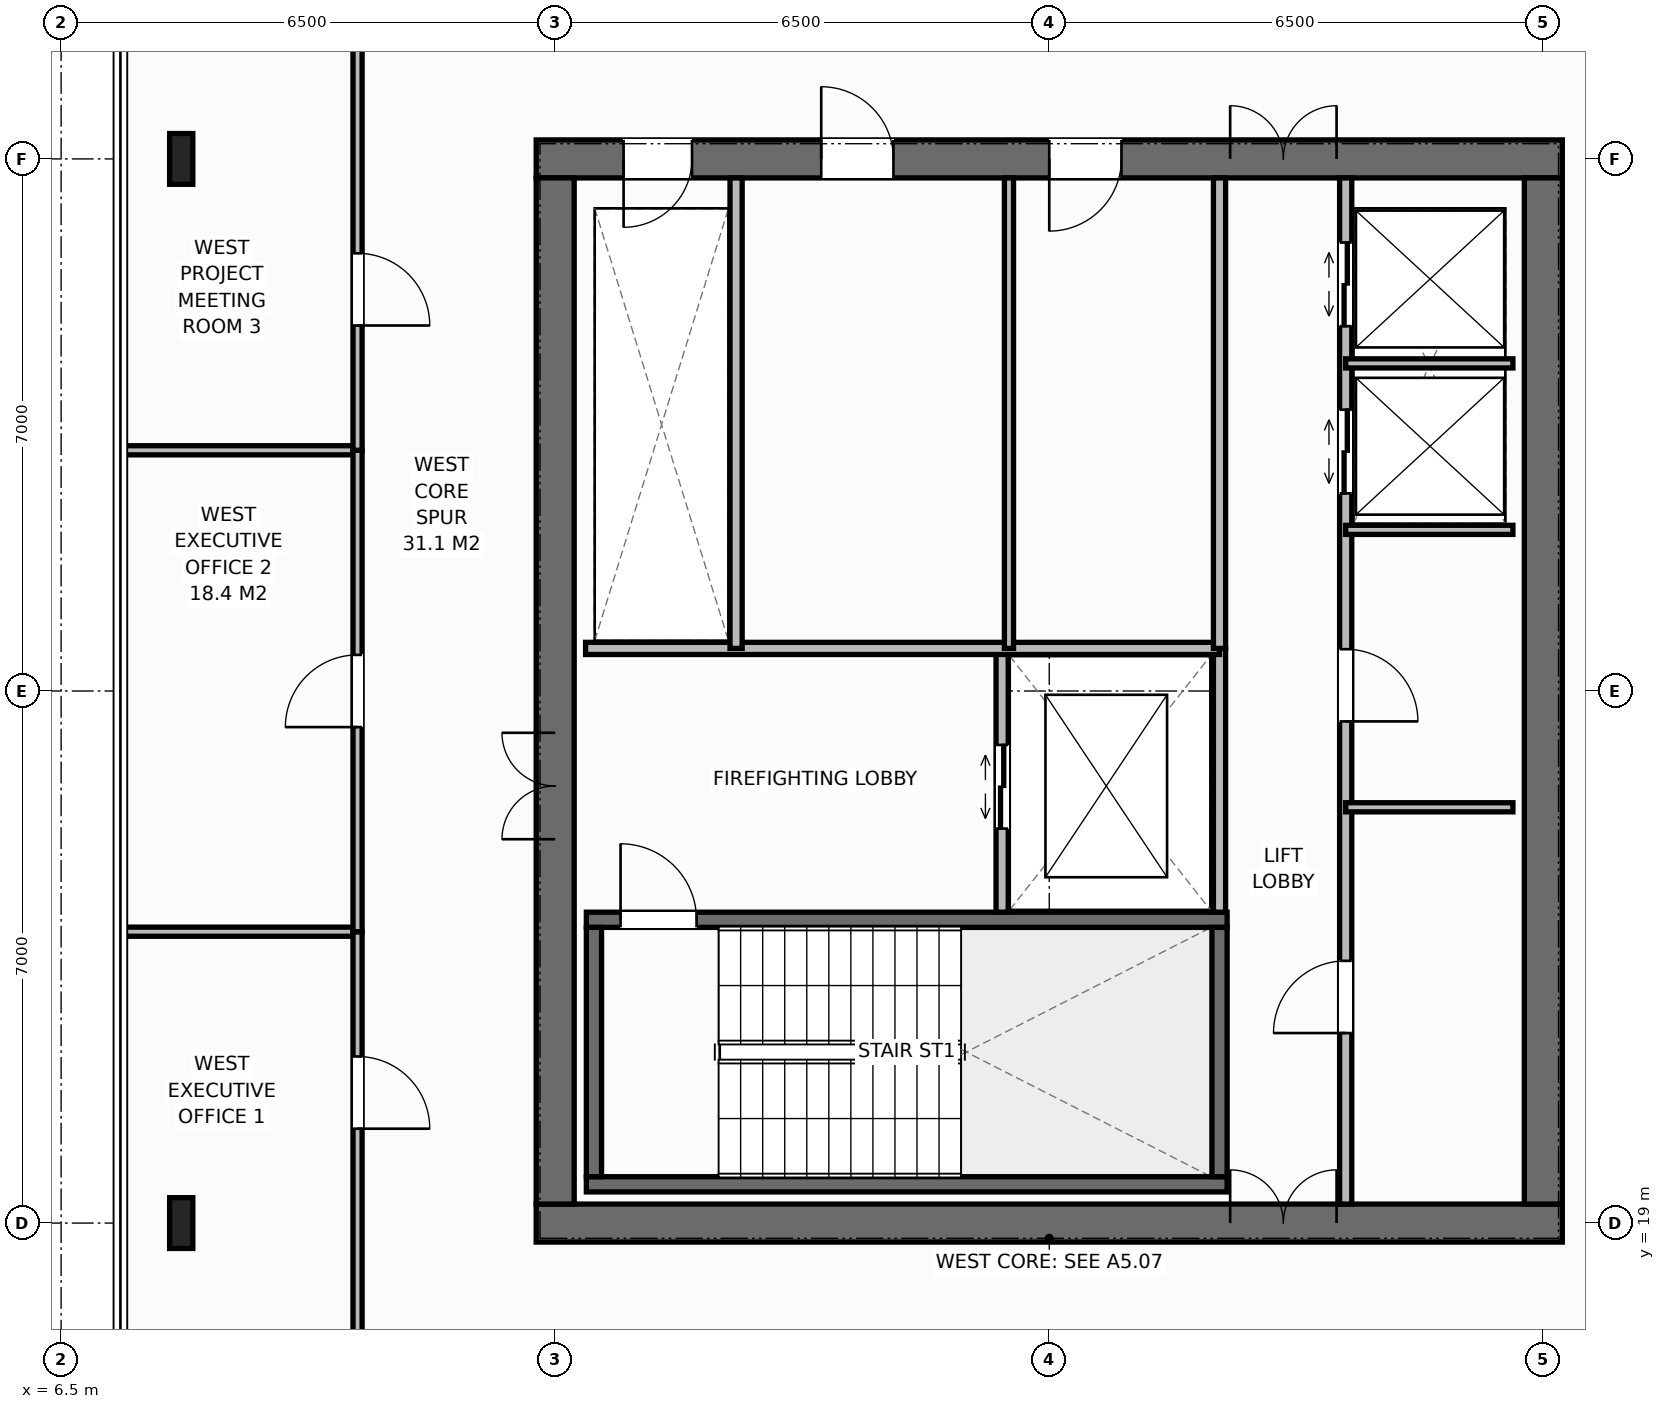
"""IFC4 building model, lengths in metres.
Left out: names, types, materials, properties, quantities, classifications, styles, units other than length and angle.
Written with IfcOpenShell. Run it as: python <this file> out.ifc"""

import sys

from ifc_helpers import new_model, si_unit, direction, frame, frame_2d, origin, origin_2d, place, context, subcontext, project, spatial, rectangle, i_section, extrude, element, fill, save


model = new_model("IFC4")
c1 = context("Model", 3, precision=1e-05, world=origin(), true_north=direction((0.0, 1.0)))
c2 = subcontext(c1, "Body", "Model", "MODEL_VIEW")
j1 = project(units=[si_unit("LENGTHUNIT", "METRE"), si_unit("PLANEANGLEUNIT", "RADIAN")], contexts=[c1])
p1 = place(None, origin())
s1 = spatial("IfcSite", under=j1, at=p1, CompositionType="ELEMENT")
p2 = place(p1, origin())
s2 = spatial("IfcBuilding", under=s1, at=p2, CompositionType="ELEMENT")
p3 = place(p2, frame((0.0, 0.0, 298.4)))
s3 = spatial("IfcBuildingStorey", under=s2, at=p3, CompositionType="ELEMENT", Elevation=298.4)
p4 = place(p3, frame((12.75, 19.0, 0.0), z_axis=(0.0, 0.0, 1.0), x_axis=(1.0, 0.0, 0.0)))
e1 = element("IfcWall", 1, at=p4, inside=s3, PredefinedType="SHEAR", context=c2, shape_type="SweptSolid", body=[
    extrude(rectangle(XDim=13.5, YDim=0.5, at=frame_2d((6.75, 0.0))), origin(), (0.0, 0.0, 1.0), 4.0),
])
p5 = place(p4, frame((9.13, 0.0, 0.0)))
e2 = element("IfcOpeningElement", 2, at=p5, cuts=e1, PredefinedType="OPENING", context=c2, shape_type="SweptSolid", body=[
    extrude(rectangle(XDim=1.4, YDim=2.2, at=frame_2d((0.7, 1.1))), frame((0.0, 0.26, 0.0), z_axis=(0.0, -1.0, 0.0), x_axis=(1.0, 0.0, 0.0)), (0.0, 0.0, 1.0), 0.52),
])
p6 = place(p3, frame((12.75, 33.0, 0.0), z_axis=(0.0, 0.0, 1.0), x_axis=(1.0, 0.0, 0.0)))
e3 = element("IfcWall", 3, at=p6, inside=s3, PredefinedType="SHEAR", context=c2, shape_type="SweptSolid", body=[
    extrude(rectangle(XDim=13.5, YDim=0.5, at=frame_2d((6.75, 0.0))), origin(), (0.0, 0.0, 1.0), 4.0),
])
p7 = place(p6, frame((1.15, 0.0, 0.0)))
e4 = element("IfcOpeningElement", 4, at=p7, cuts=e3, PredefinedType="OPENING", context=c2, shape_type="SweptSolid", body=[
    extrude(rectangle(XDim=0.9, YDim=2.15, at=frame_2d((0.45, 1.075))), frame((0.0, 0.26, 0.0), z_axis=(0.0, -1.0, 0.0), x_axis=(1.0, 0.0, 0.0)), (0.0, 0.0, 1.0), 0.52),
])
p8 = place(p6, frame((3.75, 0.0, 0.0)))
e5 = element("IfcOpeningElement", 5, at=p8, cuts=e3, PredefinedType="OPENING", context=c2, shape_type="SweptSolid", body=[
    extrude(rectangle(XDim=0.95, YDim=2.15, at=frame_2d((0.475, 1.075))), frame((0.0, 0.26, 0.0), z_axis=(0.0, -1.0, 0.0), x_axis=(1.0, 0.0, 0.0)), (0.0, 0.0, 1.0), 0.52),
])
p9 = place(p6, frame((6.75, 0.0, 0.0)))
e6 = element("IfcOpeningElement", 6, at=p9, cuts=e3, PredefinedType="OPENING", context=c2, shape_type="SweptSolid", body=[
    extrude(rectangle(XDim=0.95, YDim=2.15, at=frame_2d((0.475, 1.075))), frame((0.0, 0.26, 0.0), z_axis=(0.0, -1.0, 0.0), x_axis=(1.0, 0.0, 0.0)), (0.0, 0.0, 1.0), 0.52),
])
p10 = place(p6, frame((9.13, 0.0, 0.0)))
e7 = element("IfcOpeningElement", 7, at=p10, cuts=e3, PredefinedType="OPENING", context=c2, shape_type="SweptSolid", body=[
    extrude(rectangle(XDim=1.4, YDim=2.2, at=frame_2d((0.7, 1.1))), frame((0.0, 0.26, 0.0), z_axis=(0.0, -1.0, 0.0), x_axis=(1.0, 0.0, 0.0)), (0.0, 0.0, 1.0), 0.52),
])
p11 = place(p3, frame((13.0, 19.25, 0.0), z_axis=(0.0, 0.0, 1.0), x_axis=(0.0, 1.0, 0.0)))
e8 = element("IfcWall", 8, at=p11, inside=s3, PredefinedType="SHEAR", context=c2, shape_type="SweptSolid", body=[
    extrude(rectangle(XDim=13.5, YDim=0.5, at=frame_2d((6.75, 0.0))), origin(), (0.0, 0.0, 1.0), 4.0),
])
p12 = place(p11, frame((4.8, 0.0, 0.0)))
e9 = element("IfcOpeningElement", 9, at=p12, cuts=e8, PredefinedType="OPENING", context=c2, shape_type="SweptSolid", body=[
    extrude(rectangle(XDim=1.4, YDim=2.2, at=frame_2d((0.7, 1.1))), frame((0.0, 0.26, 0.0), z_axis=(0.0, -1.0, 0.0), x_axis=(1.0, 0.0, 0.0)), (0.0, 0.0, 1.0), 0.52),
])
p13 = place(p3, frame((26.0, 19.25, 0.0), z_axis=(0.0, 0.0, 1.0), x_axis=(0.0, 1.0, 0.0)))
e10 = element("IfcWall", 10, at=p13, inside=s3, PredefinedType="SHEAR", context=c2, shape_type="SweptSolid", body=[
    extrude(rectangle(XDim=13.5, YDim=0.5, at=frame_2d((6.75, 0.0))), origin(), (0.0, 0.0, 1.0), 4.0),
])
p14 = place(p3, frame((13.41, 19.51, 0.0), z_axis=(0.0, 0.0, 1.0), x_axis=(1.0, 0.0, 0.0)))
e11 = element("IfcWall", 11, at=p14, inside=s3, PredefinedType="SHEAR", context=c2, shape_type="SweptSolid", body=[
    extrude(rectangle(XDim=8.43, YDim=0.2, at=frame_2d((4.215, 0.0))), origin(), (0.0, 0.0, 1.0), 4.0),
])
p15 = place(p3, frame((13.41, 22.99, 0.0), z_axis=(0.0, 0.0, 1.0), x_axis=(1.0, 0.0, 0.0)))
e12 = element("IfcWall", 12, at=p15, inside=s3, PredefinedType="SHEAR", context=c2, shape_type="SweptSolid", body=[
    extrude(rectangle(XDim=8.43, YDim=0.2, at=frame_2d((4.215, 0.0))), origin(), (0.0, 0.0, 1.0), 4.0),
])
p16 = place(p15, frame((0.45, 0.0, 0.0)))
e13 = element("IfcOpeningElement", 13, at=p16, cuts=e12, PredefinedType="OPENING", context=c2, shape_type="SweptSolid", body=[
    extrude(rectangle(XDim=1.0, YDim=2.15, at=frame_2d((0.5, 1.075))), frame((0.0, 0.11, 0.0), z_axis=(0.0, -1.0, 0.0), x_axis=(1.0, 0.0, 0.0)), (0.0, 0.0, 1.0), 0.22),
])
for number, where, z_axis, x_axis in (
    (14, (13.51, 19.61, 0.0), (0.0, 0.0, 1.0), (0.0, 1.0, 0.0)),
    (15, (21.74, 19.61, 0.0), (0.0, 0.0, 1.0), (0.0, 1.0, 0.0)),
):
    element("IfcWall", number, at=place(p3, frame(where, z_axis=z_axis, x_axis=x_axis)), inside=s3, PredefinedType="SHEAR", context=c2, shape_type="SweptSolid", body=[
        extrude(rectangle(XDim=3.28, YDim=0.2, at=frame_2d((1.64, 0.0))), origin(), (0.0, 0.0, 1.0), 4.0),
    ])
for number, where, z_axis, x_axis in (
    (16, (8.08, 19.0, 0.0), (0.0, 0.0, 1.0), (1.0, 0.0, 0.0)),
    (17, (8.08, 33.0, 0.0), (0.0, 0.0, 1.0), (1.0, 0.0, 0.0)),
):
    element("IfcColumn", number, at=place(p3, frame(where, z_axis=z_axis, x_axis=x_axis)), inside=s3, PredefinedType="COLUMN", context=c2, shape_type="SweptSolid", body=[
        extrude(i_section(OverallWidth=0.305, OverallDepth=0.668, WebThickness=0.021, FlangeThickness=0.04, at=origin_2d()), origin(), (0.0, 0.0, 1.0), 4.0),
    ])
p17 = place(p3, frame((21.74, 23.09, 0.0), z_axis=(0.0, 0.0, 1.0), x_axis=(0.0, 1.0, 0.0)))
e18 = element("IfcWall", 18, at=p17, inside=s3, PredefinedType="STANDARD", context=c2, shape_type="SweptSolid", body=[
    extrude(rectangle(XDim=3.47, YDim=0.16, at=frame_2d((1.735, 0.0))), origin(), (0.0, 0.0, 1.0), 3.788),
])
p18 = place(p3, frame((18.88, 23.09, 0.0), z_axis=(0.0, 0.0, 1.0), x_axis=(0.0, 1.0, 0.0)))
e19 = element("IfcWall", 19, at=p18, inside=s3, PredefinedType="STANDARD", context=c2, shape_type="SweptSolid", body=[
    extrude(rectangle(XDim=3.47, YDim=0.16, at=frame_2d((1.735, 0.0))), origin(), (0.0, 0.0, 1.0), 3.788),
])
p19 = place(p18, frame((1.1, 0.0, 0.0)))
e20 = element("IfcOpeningElement", 20, at=p19, cuts=e19, PredefinedType="OPENING", context=c2, shape_type="SweptSolid", body=[
    extrude(rectangle(XDim=1.1, YDim=2.2, at=frame_2d((0.55, 1.1))), frame((0.0, 0.09, 0.0), z_axis=(0.0, -1.0, 0.0), x_axis=(1.0, 0.0, 0.0)), (0.0, 0.0, 1.0), 0.18),
])
p20 = place(p3, frame((13.4, 26.56, 0.0), z_axis=(0.0, 0.0, 1.0), x_axis=(1.0, 0.0, 0.0)))
e21 = element("IfcWall", 21, at=p20, inside=s3, PredefinedType="STANDARD", context=c2, shape_type="SweptSolid", body=[
    extrude(rectangle(XDim=8.34, YDim=0.16, at=frame_2d((4.17, 0.0))), origin(), (0.0, 0.0, 1.0), 3.788),
])
p21 = place(p3, frame((15.38, 26.56, 0.0), z_axis=(0.0, 0.0, 1.0), x_axis=(0.0, 1.0, 0.0)))
e22 = element("IfcWall", 22, at=p21, inside=s3, PredefinedType="STANDARD", context=c2, shape_type="SweptSolid", body=[
    extrude(rectangle(XDim=6.19, YDim=0.16, at=frame_2d((3.095, 0.0))), origin(), (0.0, 0.0, 1.0), 3.788),
])
p22 = place(p3, frame((18.97, 26.56, 0.0), z_axis=(0.0, 0.0, 1.0), x_axis=(0.0, 1.0, 0.0)))
e23 = element("IfcWall", 23, at=p22, inside=s3, PredefinedType="PARTITIONING", context=c2, shape_type="SweptSolid", body=[
    extrude(rectangle(XDim=6.19, YDim=0.12, at=frame_2d((3.095, 0.0))), origin(), (0.0, 0.0, 1.0), 3.788),
])
p23 = place(p3, frame((21.74, 26.56, 0.0), z_axis=(0.0, 0.0, 1.0), x_axis=(0.0, 1.0, 0.0)))
e24 = element("IfcWall", 24, at=p23, inside=s3, PredefinedType="STANDARD", context=c2, shape_type="SweptSolid", body=[
    extrude(rectangle(XDim=6.19, YDim=0.16, at=frame_2d((3.095, 0.0))), origin(), (0.0, 0.0, 1.0), 3.788),
])
p24 = place(p3, frame((23.4, 19.25, 0.0), z_axis=(0.0, 0.0, 1.0), x_axis=(0.0, 1.0, 0.0)))
e25 = element("IfcWall", 25, at=p24, inside=s3, PredefinedType="STANDARD", context=c2, shape_type="SweptSolid", body=[
    extrude(rectangle(XDim=13.5, YDim=0.16, at=frame_2d((6.75, 0.0))), origin(), (0.0, 0.0, 1.0), 3.788),
])
p25 = place(p24, frame((2.25, 0.0, 0.0)))
e26 = element("IfcOpeningElement", 26, at=p25, cuts=e25, PredefinedType="OPENING", context=c2, shape_type="SweptSolid", body=[
    extrude(rectangle(XDim=0.95, YDim=2.15, at=frame_2d((0.475, 1.075))), frame((0.0, 0.09, 0.0), z_axis=(0.0, -1.0, 0.0), x_axis=(1.0, 0.0, 0.0)), (0.0, 0.0, 1.0), 0.18),
])
p26 = place(p24, frame((6.35, 0.0, 0.0)))
e27 = element("IfcOpeningElement", 27, at=p26, cuts=e25, PredefinedType="OPENING", context=c2, shape_type="SweptSolid", body=[
    extrude(rectangle(XDim=0.95, YDim=2.15, at=frame_2d((0.475, 1.075))), frame((0.0, 0.09, 0.0), z_axis=(0.0, -1.0, 0.0), x_axis=(1.0, 0.0, 0.0)), (0.0, 0.0, 1.0), 0.18),
])
p27 = place(p24, frame((9.35, 0.0, 0.0)))
e28 = element("IfcOpeningElement", 28, at=p27, cuts=e25, PredefinedType="OPENING", context=c2, shape_type="SweptSolid", body=[
    extrude(rectangle(XDim=1.1, YDim=2.2, at=frame_2d((0.55, 1.1))), frame((0.0, 0.09, 0.0), z_axis=(0.0, -1.0, 0.0), x_axis=(1.0, 0.0, 0.0)), (0.0, 0.0, 1.0), 0.18),
])
p28 = place(p24, frame((11.55, 0.0, 0.0)))
e29 = element("IfcOpeningElement", 29, at=p28, cuts=e25, PredefinedType="OPENING", context=c2, shape_type="SweptSolid", body=[
    extrude(rectangle(XDim=1.1, YDim=2.2, at=frame_2d((0.55, 1.1))), frame((0.0, 0.09, 0.0), z_axis=(0.0, -1.0, 0.0), x_axis=(1.0, 0.0, 0.0)), (0.0, 0.0, 1.0), 0.18),
])
for number, where, z_axis, x_axis in (
    (30, (23.4, 24.47, 0.0), (0.0, 0.0, 1.0), (1.0, 0.0, 0.0)),
    (31, (23.4, 28.12, 0.0), (0.0, 0.0, 1.0), (1.0, 0.0, 0.0)),
    (32, (23.4, 30.31, 0.0), (0.0, 0.0, 1.0), (1.0, 0.0, 0.0)),
):
    element("IfcWall", number, at=place(p3, frame(where, z_axis=z_axis, x_axis=x_axis)), inside=s3, PredefinedType="PARTITIONING", context=c2, shape_type="SweptSolid", body=[
        extrude(rectangle(XDim=2.2, YDim=0.12, at=frame_2d((1.1, 0.0))), origin(), (0.0, 0.0, 1.0), 3.788),
    ])
p29 = place(p3, frame((7.22, 22.833, 0.0), z_axis=(0.0, 0.0, 1.0), x_axis=(1.0, 0.0, 0.0)))
e33 = element("IfcWall", 33, at=p29, inside=s3, PredefinedType="PARTITIONING", context=c2, shape_type="SweptSolid", body=[
    extrude(rectangle(XDim=3.18, YDim=0.12, at=frame_2d((1.59, 0.0))), origin(), (0.0, 0.0, 1.0), 3.788),
])
p30 = place(p3, frame((10.4, 16.5, 0.0), z_axis=(0.0, 0.0, 1.0), x_axis=(0.0, 1.0, 0.0)))
e34 = element("IfcWall", 34, at=p30, inside=s3, PredefinedType="PARTITIONING", context=c2, shape_type="SweptSolid", body=[
    extrude(rectangle(XDim=6.333, YDim=0.12, at=frame_2d((3.167, 0.0))), origin(), (0.0, 0.0, 1.0), 3.788),
])
p31 = place(p30, frame((3.742, 0.0, 0.0)))
e35 = element("IfcOpeningElement", 35, at=p31, cuts=e34, PredefinedType="OPENING", context=c2, shape_type="SweptSolid", body=[
    extrude(rectangle(XDim=0.95, YDim=2.15, at=frame_2d((0.475, 1.075))), frame((0.0, 0.07, 0.0), z_axis=(0.0, -1.0, 0.0), x_axis=(1.0, 0.0, 0.0)), (0.0, 0.0, 1.0), 0.14),
])
p32 = place(p3, frame((7.22, 29.167, 0.0), z_axis=(0.0, 0.0, 1.0), x_axis=(1.0, 0.0, 0.0)))
e36 = element("IfcWall", 36, at=p32, inside=s3, PredefinedType="PARTITIONING", context=c2, shape_type="SweptSolid", body=[
    extrude(rectangle(XDim=3.18, YDim=0.12, at=frame_2d((1.59, 0.0))), origin(), (0.0, 0.0, 1.0), 3.788),
])
p33 = place(p3, frame((10.4, 22.833, 0.0), z_axis=(0.0, 0.0, 1.0), x_axis=(0.0, 1.0, 0.0)))
e37 = element("IfcWall", 37, at=p33, inside=s3, PredefinedType="PARTITIONING", context=c2, shape_type="SweptSolid", body=[
    extrude(rectangle(XDim=6.333, YDim=0.12, at=frame_2d((3.167, 0.0))), origin(), (0.0, 0.0, 1.0), 3.788),
])
p34 = place(p33, frame((2.692, 0.0, 0.0)))
e38 = element("IfcOpeningElement", 38, at=p34, cuts=e37, PredefinedType="OPENING", context=c2, shape_type="SweptSolid", body=[
    extrude(rectangle(XDim=0.95, YDim=2.15, at=frame_2d((0.475, 1.075))), frame((0.0, 0.07, 0.0), z_axis=(0.0, -1.0, 0.0), x_axis=(1.0, 0.0, 0.0)), (0.0, 0.0, 1.0), 0.14),
])
p35 = place(p3, frame((10.4, 29.167, 0.0), z_axis=(0.0, 0.0, 1.0), x_axis=(0.0, 1.0, 0.0)))
e39 = element("IfcWall", 39, at=p35, inside=s3, PredefinedType="PARTITIONING", context=c2, shape_type="SweptSolid", body=[
    extrude(rectangle(XDim=6.333, YDim=0.12, at=frame_2d((3.167, 0.0))), origin(), (0.0, 0.0, 1.0), 3.788),
])
p36 = place(p35, frame((1.642, 0.0, 0.0)))
e40 = element("IfcOpeningElement", 40, at=p36, cuts=e39, PredefinedType="OPENING", context=c2, shape_type="SweptSolid", body=[
    extrude(rectangle(XDim=0.95, YDim=2.15, at=frame_2d((0.475, 1.075))), frame((0.0, 0.07, 0.0), z_axis=(0.0, -1.0, 0.0), x_axis=(1.0, 0.0, 0.0)), (0.0, 0.0, 1.0), 0.14),
])
p37 = place(p16, origin())
e41 = element("IfcDoor", 41, at=p37, inside=s3, OperationType="SINGLE_SWING_LEFT", PredefinedType="DOOR", context=c2, shape_type="SweptSolid", body=[
    extrude(rectangle(XDim=1.0, YDim=2.15, at=frame_2d((0.5, 1.075))), frame((0.0, 0.025, 0.0), z_axis=(0.0, -1.0, 0.0), x_axis=(1.0, 0.0, 0.0)), (0.0, 0.0, 1.0), 0.05),
])
fill(e13, e41)
p38 = place(p12, origin())
e42 = element("IfcDoor", 42, at=p38, inside=s3, OperationType="DOUBLE_DOOR_SINGLE_SWING", PredefinedType="DOOR", context=c2, shape_type="SweptSolid", body=[
    extrude(rectangle(XDim=1.4, YDim=2.2, at=frame_2d((0.7, 1.1))), frame((0.0, 0.025, 0.0), z_axis=(0.0, -1.0, 0.0), x_axis=(1.0, 0.0, 0.0)), (0.0, 0.0, 1.0), 0.05),
])
fill(e9, e42)
p39 = place(p19, origin())
e43 = element("IfcDoor", 43, at=p39, inside=s3, OperationType="DOUBLE_DOOR_SLIDING", PredefinedType="DOOR", context=c2, shape_type="SweptSolid", body=[
    extrude(rectangle(XDim=1.1, YDim=2.2, at=frame_2d((0.55, 1.1))), frame((0.0, 0.025, 0.0), z_axis=(0.0, -1.0, 0.0), x_axis=(1.0, 0.0, 0.0)), (0.0, 0.0, 1.0), 0.05),
])
fill(e20, e43)
p40 = place(p7, origin())
e44 = element("IfcDoor", 44, at=p40, inside=s3, OperationType="SINGLE_SWING_RIGHT", PredefinedType="DOOR", context=c2, shape_type="SweptSolid", body=[
    extrude(rectangle(XDim=0.9, YDim=2.15, at=frame_2d((0.45, 1.075))), frame((0.0, -0.025, 0.0), z_axis=(0.0, -1.0, 0.0), x_axis=(1.0, 0.0, 0.0)), (0.0, 0.0, 1.0), 0.05),
])
fill(e4, e44)
p41 = place(p8, origin())
e45 = element("IfcDoor", 45, at=p41, inside=s3, OperationType="SINGLE_SWING_LEFT", PredefinedType="DOOR", context=c2, shape_type="SweptSolid", body=[
    extrude(rectangle(XDim=0.95, YDim=2.15, at=frame_2d((0.475, 1.075))), frame((0.0, -0.025, 0.0), z_axis=(0.0, -1.0, 0.0), x_axis=(1.0, 0.0, 0.0)), (0.0, 0.0, 1.0), 0.05),
])
fill(e5, e45)
p42 = place(p9, origin())
e46 = element("IfcDoor", 46, at=p42, inside=s3, OperationType="SINGLE_SWING_RIGHT", PredefinedType="DOOR", context=c2, shape_type="SweptSolid", body=[
    extrude(rectangle(XDim=0.95, YDim=2.15, at=frame_2d((0.475, 1.075))), frame((0.0, -0.025, 0.0), z_axis=(0.0, -1.0, 0.0), x_axis=(1.0, 0.0, 0.0)), (0.0, 0.0, 1.0), 0.05),
])
fill(e6, e46)
p43 = place(p5, origin())
e47 = element("IfcDoor", 47, at=p43, inside=s3, OperationType="DOUBLE_DOOR_SINGLE_SWING", PredefinedType="DOOR", context=c2, shape_type="SweptSolid", body=[
    extrude(rectangle(XDim=1.4, YDim=2.2, at=frame_2d((0.7, 1.1))), frame((0.0, 0.075, 0.0), z_axis=(0.0, -1.0, 0.0), x_axis=(1.0, 0.0, 0.0)), (0.0, 0.0, 1.0), 0.05),
])
fill(e2, e47)
p44 = place(p10, origin())
e48 = element("IfcDoor", 48, at=p44, inside=s3, OperationType="DOUBLE_DOOR_SINGLE_SWING", PredefinedType="DOOR", context=c2, shape_type="SweptSolid", body=[
    extrude(rectangle(XDim=1.4, YDim=2.2, at=frame_2d((0.7, 1.1))), frame((0.0, -0.025, 0.0), z_axis=(0.0, -1.0, 0.0), x_axis=(1.0, 0.0, 0.0)), (0.0, 0.0, 1.0), 0.05),
])
fill(e7, e48)
p45 = place(p25, origin())
e49 = element("IfcDoor", 49, at=p45, inside=s3, OperationType="SINGLE_SWING_LEFT", PredefinedType="DOOR", context=c2, shape_type="SweptSolid", body=[
    extrude(rectangle(XDim=0.95, YDim=2.15, at=frame_2d((0.475, 1.075))), frame((0.0, 0.025, 0.0), z_axis=(0.0, -1.0, 0.0), x_axis=(1.0, 0.0, 0.0)), (0.0, 0.0, 1.0), 0.05),
])
fill(e26, e49)
p46 = place(p26, origin())
e50 = element("IfcDoor", 50, at=p46, inside=s3, OperationType="SINGLE_SWING_RIGHT", PredefinedType="DOOR", context=c2, shape_type="SweptSolid", body=[
    extrude(rectangle(XDim=0.95, YDim=2.15, at=frame_2d((0.475, 1.075))), frame((0.0, 0.025, 0.0), z_axis=(0.0, -1.0, 0.0), x_axis=(1.0, 0.0, 0.0)), (0.0, 0.0, 1.0), 0.05),
])
fill(e27, e50)
p47 = place(p27, origin())
e51 = element("IfcDoor", 51, at=p47, inside=s3, OperationType="DOUBLE_DOOR_SLIDING", PredefinedType="DOOR", context=c2, shape_type="SweptSolid", body=[
    extrude(rectangle(XDim=1.1, YDim=2.2, at=frame_2d((0.55, 1.1))), frame((0.0, 0.025, 0.0), z_axis=(0.0, -1.0, 0.0), x_axis=(1.0, 0.0, 0.0)), (0.0, 0.0, 1.0), 0.05),
])
fill(e28, e51)
p48 = place(p28, origin())
e52 = element("IfcDoor", 52, at=p48, inside=s3, OperationType="DOUBLE_DOOR_SLIDING", PredefinedType="DOOR", context=c2, shape_type="SweptSolid", body=[
    extrude(rectangle(XDim=1.1, YDim=2.2, at=frame_2d((0.55, 1.1))), frame((0.0, 0.025, 0.0), z_axis=(0.0, -1.0, 0.0), x_axis=(1.0, 0.0, 0.0)), (0.0, 0.0, 1.0), 0.05),
])
fill(e29, e52)
p49 = place(p31, origin())
e53 = element("IfcDoor", 53, at=p49, inside=s3, OperationType="SINGLE_SWING_RIGHT", PredefinedType="DOOR", context=c2, shape_type="SweptSolid", body=[
    extrude(rectangle(XDim=0.95, YDim=2.15, at=frame_2d((0.475, 1.075))), frame((0.0, 0.025, 0.0), z_axis=(0.0, -1.0, 0.0), x_axis=(1.0, 0.0, 0.0)), (0.0, 0.0, 1.0), 0.05),
])
fill(e35, e53)
p50 = place(p34, origin())
e54 = element("IfcDoor", 54, at=p50, inside=s3, OperationType="SINGLE_SWING_LEFT", PredefinedType="DOOR", context=c2, shape_type="SweptSolid", body=[
    extrude(rectangle(XDim=0.95, YDim=2.15, at=frame_2d((0.475, 1.075))), frame((0.0, 0.025, 0.0), z_axis=(0.0, -1.0, 0.0), x_axis=(1.0, 0.0, 0.0)), (0.0, 0.0, 1.0), 0.05),
])
fill(e38, e54)
p51 = place(p36, origin())
e55 = element("IfcDoor", 55, at=p51, inside=s3, OperationType="SINGLE_SWING_RIGHT", PredefinedType="DOOR", context=c2, shape_type="SweptSolid", body=[
    extrude(rectangle(XDim=0.95, YDim=2.15, at=frame_2d((0.475, 1.075))), frame((0.0, 0.025, 0.0), z_axis=(0.0, -1.0, 0.0), x_axis=(1.0, 0.0, 0.0)), (0.0, 0.0, 1.0), 0.05),
])
fill(e40, e55)
save(model, sys.argv[1])
